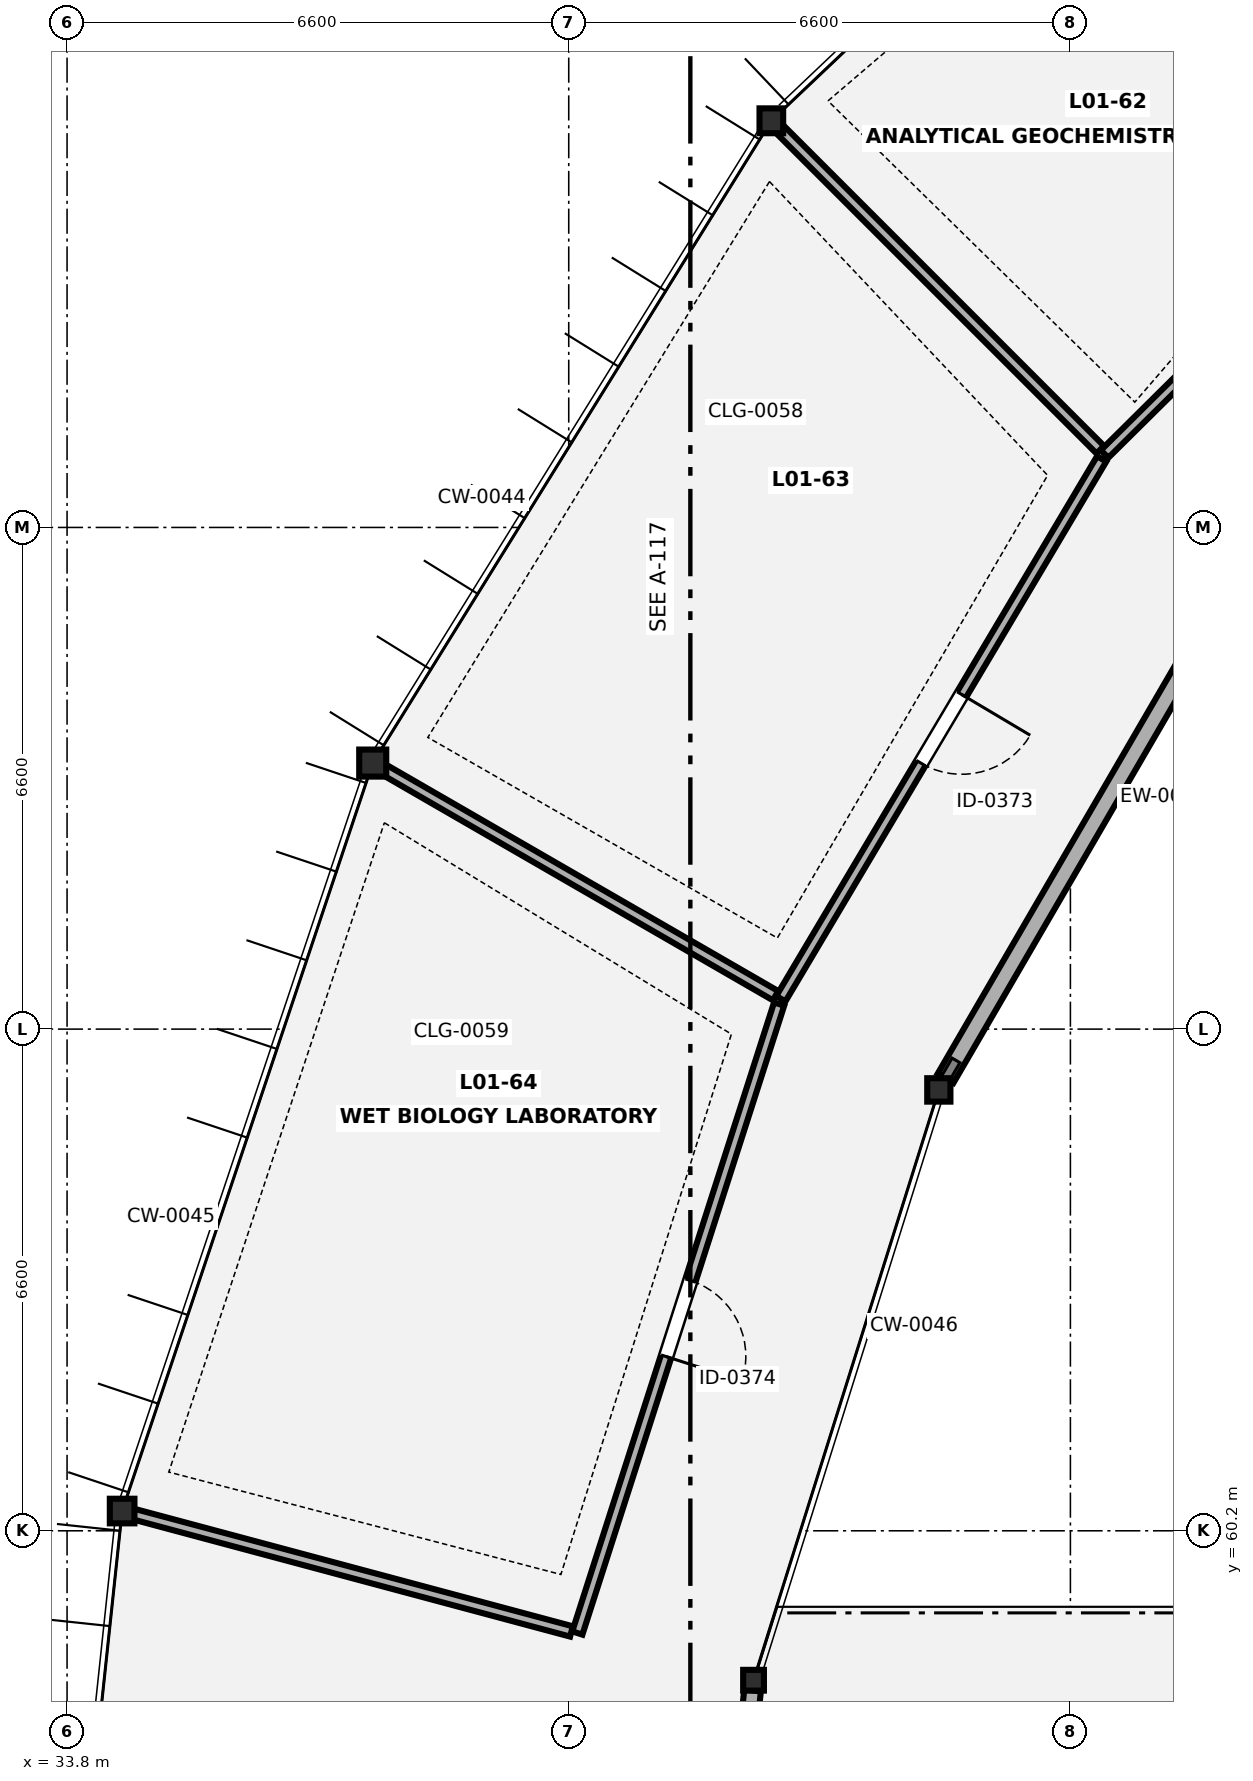
"""IFC4 building model, lengths in metres.
Left out: names, types, materials, properties, quantities, classifications, styles, units other than length and angle.
Written with IfcOpenShell. Run it as: python <this file> out.ifc"""

import sys

from ifc_helpers import new_model, si_unit, direction, frame, frame_2d, origin, origin_2d, place, context, subcontext, project, spatial, rectangle, hollow_circle, i_section, extrude, element, fill, save


model = new_model("IFC4")
c1 = context("Model", 3, precision=1e-05, world=origin(), true_north=direction((0.0, 1.0)))
c2 = subcontext(c1, "Body", "Model", "MODEL_VIEW")
j1 = project(units=[si_unit("LENGTHUNIT", "METRE"), si_unit("PLANEANGLEUNIT", "RADIAN")], contexts=[c1])
p1 = place(None, origin())
s1 = spatial("IfcSite", under=j1, at=p1, CompositionType="ELEMENT")
p2 = place(p1, origin())
s2 = spatial("IfcBuilding", under=s1, at=p2, CompositionType="ELEMENT")
p3 = place(p2, frame((0.0, 0.0, 4.9)))
s3 = spatial("IfcBuildingStorey", under=s2, at=p3, CompositionType="ELEMENT", Elevation=4.9)
p4 = place(p3, frame((43.065, 78.75, 0.0), z_axis=(0.0, 0.0, 1.0), x_axis=(1.0, 0.0, 0.0)))
e1 = element("IfcColumn", 1, at=p4, inside=s3, PredefinedType="COLUMN", context=c2, shape_type="SweptSolid", body=[
    extrude(i_section(OverallWidth=0.311, OverallDepth=0.327, WebThickness=0.016, FlangeThickness=0.025, FilletRadius=0.017, at=origin_2d()), origin(), (0.0, 0.0, 1.0), 4.2),
])
p5 = place(p3, frame((37.821, 70.3, 0.0), z_axis=(0.0, 0.0, 1.0), x_axis=(1.0, 0.0, 0.0)))
e2 = element("IfcColumn", 2, at=p5, inside=s3, PredefinedType="COLUMN", context=c2, shape_type="SweptSolid", body=[
    extrude(hollow_circle(Radius=0.178, WallThickness=0.013, at=origin_2d()), origin(), (0.0, 0.0, 1.0), 4.2),
])
p6 = place(p3, frame((45.269, 66.0, 0.0), z_axis=(0.0, 0.0, 1.0), x_axis=(1.0, 0.0, 0.0)))
e3 = element("IfcColumn", 3, at=p6, inside=s3, PredefinedType="COLUMN", context=c2, shape_type="SweptSolid", body=[
    extrude(i_section(OverallWidth=0.305, OverallDepth=0.308, WebThickness=0.01, FlangeThickness=0.015, FilletRadius=0.017, at=origin_2d()), origin(), (0.0, 0.0, 1.0), 4.2),
])
p7 = place(p3, frame((34.524, 60.46, 0.0), z_axis=(0.0, 0.0, 1.0), x_axis=(1.0, 0.0, 0.0)))
e4 = element("IfcColumn", 4, at=p7, inside=s3, PredefinedType="COLUMN", context=c2, shape_type="SweptSolid", body=[
    extrude(hollow_circle(Radius=0.162, WallThickness=0.013, at=origin_2d()), origin(), (0.0, 0.0, 1.0), 4.2),
])
p8 = place(p3, frame((42.831, 58.234, 0.0), z_axis=(0.0, 0.0, 1.0), x_axis=(1.0, 0.0, 0.0)))
e5 = element("IfcColumn", 5, at=p8, inside=s3, PredefinedType="COLUMN", context=c2, shape_type="SweptSolid", body=[
    extrude(hollow_circle(Radius=0.136, WallThickness=0.009, at=origin_2d()), origin(), (0.0, 0.0, 1.0), 4.2),
])
p9 = place(p3, frame((49.056, 72.513, 0.0), z_axis=(0.0, 0.0, 1.0), x_axis=(-0.502653329169, -0.86448807434, 0.0)))
e6 = element("IfcWall", 6, at=p9, inside=s3, PredefinedType="SOLIDWALL", context=c2, shape_type="SweptSolid", body=[
    extrude(rectangle(XDim=7.358, YDim=0.24, at=frame_2d((3.679, 0.0))), origin(), (0.0, 0.0, 1.0), 3.65),
])
p10 = place(p3, frame((42.818, 58.1, 0.0), z_axis=(0.0, 0.0, 1.0), x_axis=(-0.099291432912, -0.99505839595, 0.0)))
e7 = element("IfcWall", 7, at=p10, inside=s3, PredefinedType="SOLIDWALL", context=c2, shape_type="SweptSolid", body=[
    extrude(rectangle(XDim=8.085, YDim=0.22, at=frame_2d((4.042, 0.0))), origin(), (0.0, 0.0, 1.0), 3.65),
])
p11 = place(p10, frame((0.21, 0.0, 0.0)))
e8 = element("IfcOpeningElement", 8, at=p11, cuts=e7, PredefinedType="OPENING", context=c2, shape_type="SweptSolid", body=[
    extrude(rectangle(XDim=1.35, YDim=2.15, at=frame_2d((0.675, 1.075))), frame((0.0, 0.12, 0.0), z_axis=(0.0, -1.0, 0.0), x_axis=(1.0, 0.0, 0.0)), (0.0, 0.0, 1.0), 0.24),
])
p12 = place(p3, frame((52.999, 79.863, 0.0), z_axis=(0.0, 0.0, 1.0), x_axis=(-0.710427757183, -0.703770134222, 0.0)))
e9 = element("IfcWall", 9, at=p12, inside=s3, PredefinedType="PARTITIONING", context=c2, shape_type="SweptSolid", body=[
    extrude(rectangle(XDim=7.811, YDim=0.14, at=frame_2d((3.905, 0.0))), origin(), (0.0, 0.0, 1.0), 3.98),
])
p13 = place(p3, frame((47.393, 74.423, 0.0), z_axis=(0.0, 0.0, 1.0), x_axis=(-0.707106781187, 0.707106781187, 0.0)))
e10 = element("IfcWall", 10, at=p13, inside=s3, PredefinedType="PARTITIONING", context=c2, shape_type="SweptSolid", body=[
    extrude(rectangle(XDim=6.06, YDim=0.14, at=frame_2d((3.03, 0.0))), origin(), (0.0, 0.0, 1.0), 3.323),
])
p14 = place(p3, frame((47.412, 74.302, 0.0), z_axis=(0.0, 0.0, 1.0), x_axis=(-0.51092787214, -0.85962358592, 0.0)))
e11 = element("IfcWall", 11, at=p14, inside=s3, PredefinedType="PARTITIONING", context=c2, shape_type="SweptSolid", body=[
    extrude(rectangle(XDim=8.262, YDim=0.14, at=frame_2d((4.131, 0.0))), origin(), (0.0, 0.0, 1.0), 3.98),
])
p15 = place(p14, frame((3.606, 0.0, 0.0)))
e12 = element("IfcOpeningElement", 12, at=p15, cuts=e11, PredefinedType="OPENING", context=c2, shape_type="SweptSolid", body=[
    extrude(rectangle(XDim=1.05, YDim=2.15, at=frame_2d((0.525, 1.075))), frame((0.0, 0.08, 0.0), z_axis=(0.0, -1.0, 0.0), x_axis=(1.0, 0.0, 0.0)), (0.0, 0.0, 1.0), 0.16),
])
p16 = place(p3, frame((43.121, 67.24, 0.0), z_axis=(0.0, 0.0, 1.0), x_axis=(-0.866010470582, 0.500025864173, 0.0)))
e13 = element("IfcWall", 13, at=p16, inside=s3, PredefinedType="PARTITIONING", context=c2, shape_type="SweptSolid", body=[
    extrude(rectangle(XDim=6.06, YDim=0.14, at=frame_2d((3.03, 0.0))), origin(), (0.0, 0.0, 1.0), 3.392),
])
p17 = place(p3, frame((43.168, 67.13, 0.0), z_axis=(0.0, 0.0, 1.0), x_axis=(-0.305487150125, -0.952196198852, 0.0)))
e14 = element("IfcWall", 14, at=p17, inside=s3, PredefinedType="PARTITIONING", context=c2, shape_type="SweptSolid", body=[
    extrude(rectangle(XDim=8.69, YDim=0.14, at=frame_2d((4.345, 0.0))), origin(), (0.0, 0.0, 1.0), 3.98),
])
p18 = place(p17, frame((3.82, 0.0, 0.0)))
e15 = element("IfcOpeningElement", 15, at=p18, cuts=e14, PredefinedType="OPENING", context=c2, shape_type="SweptSolid", body=[
    extrude(rectangle(XDim=1.05, YDim=2.15, at=frame_2d((0.525, 1.075))), frame((0.0, 0.08, 0.0), z_axis=(0.0, -1.0, 0.0), x_axis=(1.0, 0.0, 0.0)), (0.0, 0.0, 1.0), 0.16),
])
p19 = place(p3, frame((40.436, 58.876, 0.0), z_axis=(0.0, 0.0, 1.0), x_axis=(-0.965916578341, 0.258853556448, 0.0)))
e16 = element("IfcWall", 16, at=p19, inside=s3, PredefinedType="PARTITIONING", context=c2, shape_type="SweptSolid", body=[
    extrude(rectangle(XDim=6.06, YDim=0.14, at=frame_2d((3.03, 0.0))), origin(), (0.0, 0.0, 1.0), 3.392),
])
p20 = place(p15, origin())
e17 = element("IfcDoor", 17, at=p20, inside=s3, OperationType="SINGLE_SWING_LEFT", PredefinedType="DOOR", context=c2, shape_type="SweptSolid", body=[
    extrude(rectangle(XDim=1.05, YDim=2.15, at=frame_2d((0.525, 1.075))), frame((0.0, 0.025, 0.0), z_axis=(0.0, -1.0, 0.0), x_axis=(1.0, 0.0, 0.0)), (0.0, 0.0, 1.0), 0.05),
])
fill(e12, e17)
p21 = place(p18, origin())
e18 = element("IfcDoor", 18, at=p21, inside=s3, OperationType="SINGLE_SWING_RIGHT", PredefinedType="DOOR", context=c2, shape_type="SweptSolid", body=[
    extrude(rectangle(XDim=1.05, YDim=2.15, at=frame_2d((0.525, 1.075))), frame((0.0, 0.025, 0.0), z_axis=(0.0, -1.0, 0.0), x_axis=(1.0, 0.0, 0.0)), (0.0, 0.0, 1.0), 0.05),
])
fill(e15, e18)
save(model, sys.argv[1])
